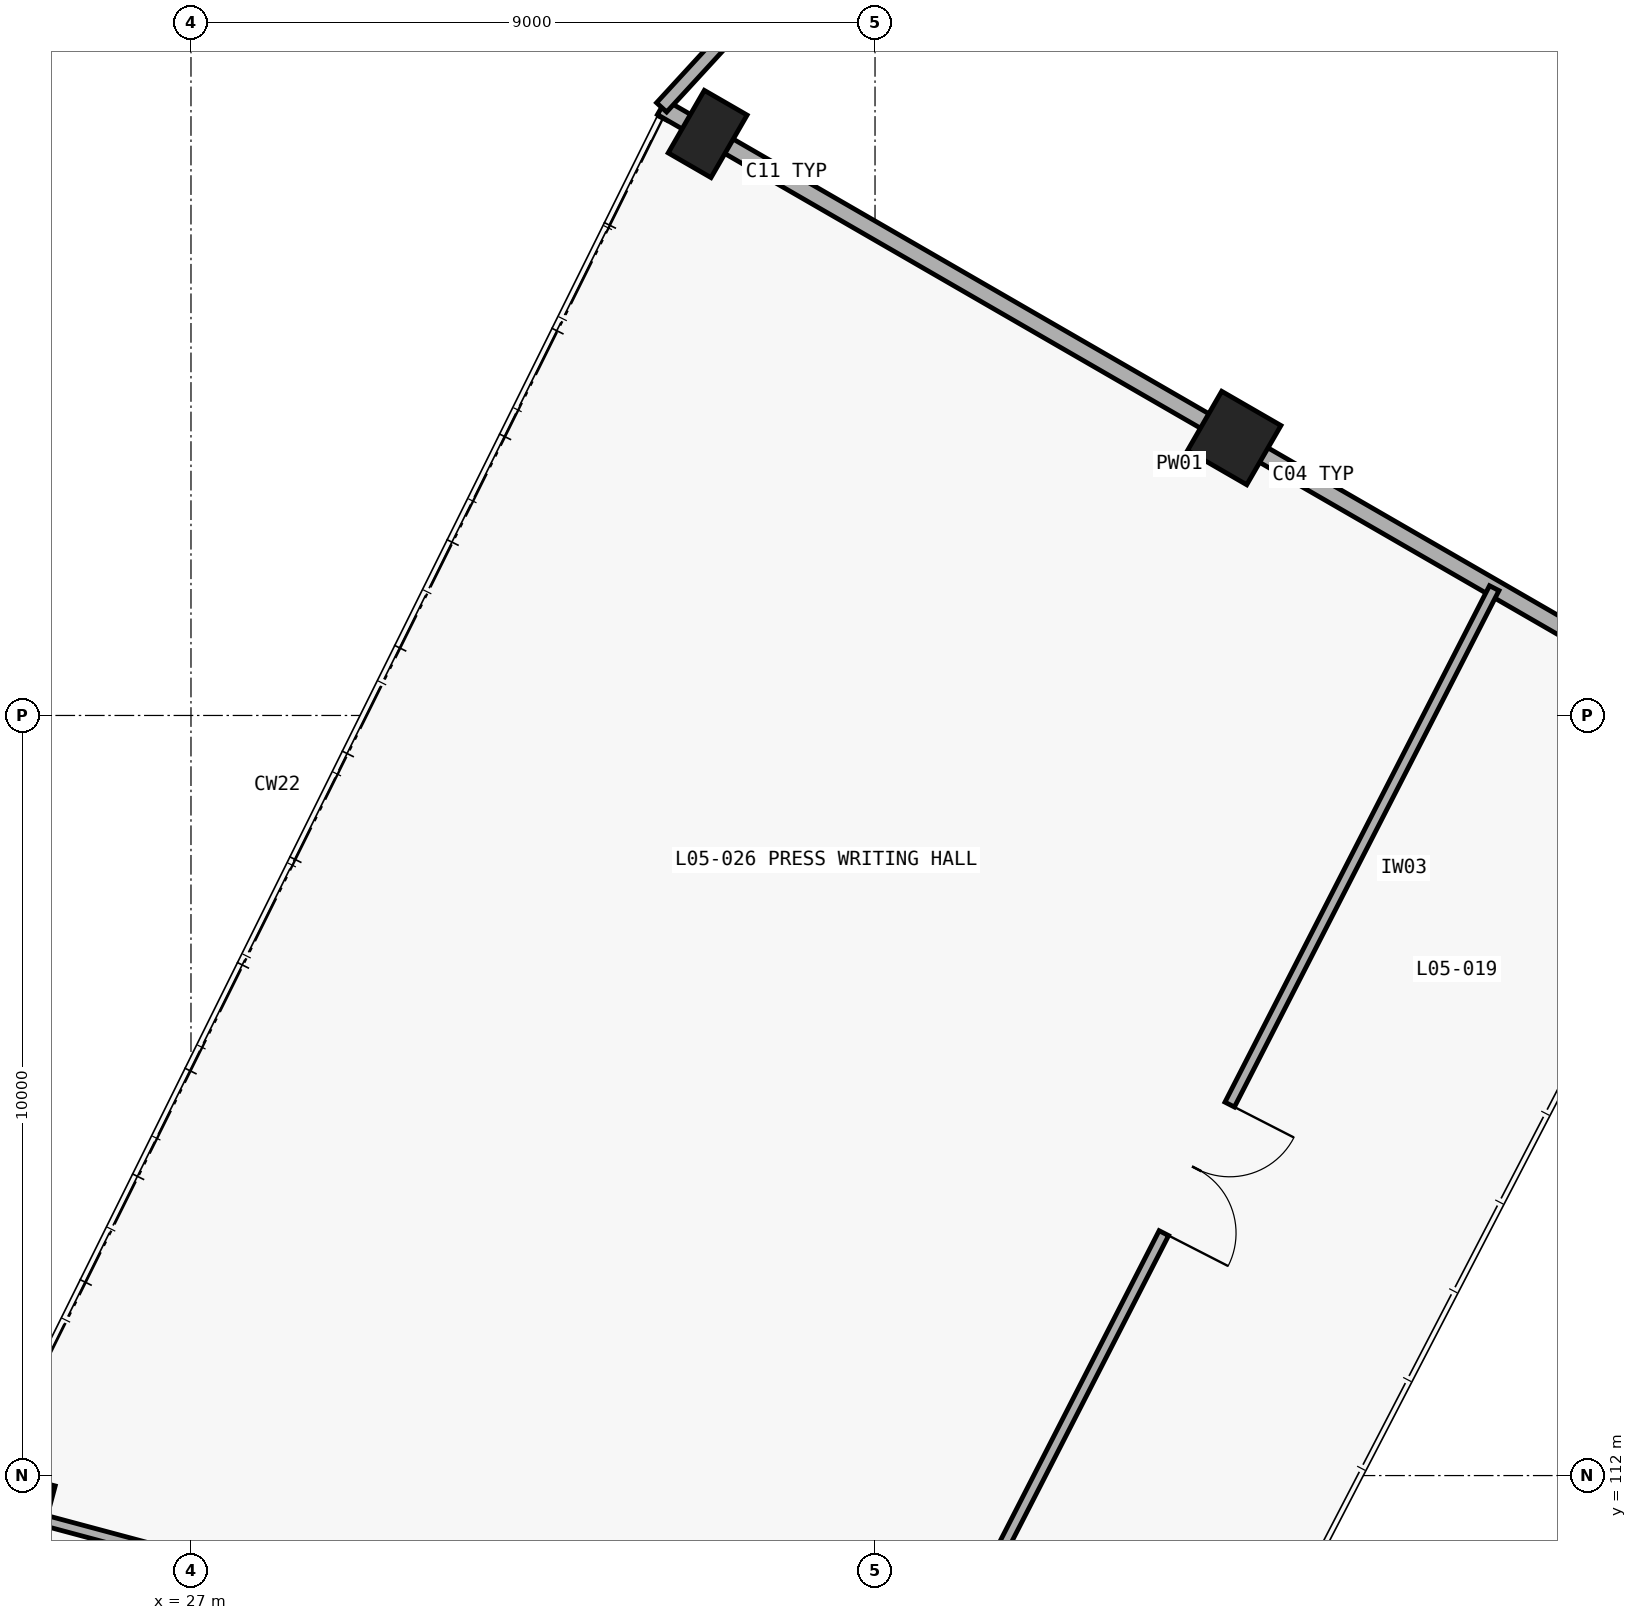
"""IFC4 building model, lengths in metres.
Left out: names, types, materials, properties, quantities, classifications, styles, units other than length and angle.
Written with IfcOpenShell. Run it as: python <this file> out.ifc"""

import sys

from ifc_helpers import new_model, si_unit, direction, frame, frame_2d, origin, origin_2d, place, context, subcontext, project, spatial, rectangle, extrude, element, fill, save


model = new_model("IFC4")
c1 = context("Model", 3, precision=1e-05, world=origin(), true_north=direction((0.0, 1.0)))
c2 = subcontext(c1, "Body", "Model", "MODEL_VIEW")
j1 = project(units=[si_unit("LENGTHUNIT", "METRE"), si_unit("PLANEANGLEUNIT", "RADIAN")], contexts=[c1])
p1 = place(None, origin())
s1 = spatial("IfcSite", under=j1, at=p1, CompositionType="ELEMENT")
p2 = place(p1, origin())
s2 = spatial("IfcBuilding", under=s1, at=p2, CompositionType="ELEMENT")
p3 = place(p2, frame((0.0, 0.0, 24.6)))
s3 = spatial("IfcBuildingStorey", under=s2, at=p3, CompositionType="ELEMENT", Elevation=24.6)
p4 = place(p3, frame((33.798, 129.65, 0.0), z_axis=(0.0, 0.0, 1.0), x_axis=(-0.866025403784, 0.5, 0.0)))
e1 = element("IfcColumn", 1, at=p4, inside=s3, PredefinedType="COLUMN", context=c2, shape_type="SweptSolid", body=[
    extrude(rectangle(XDim=0.65, YDim=0.95, at=origin_2d()), origin(), (0.0, 0.0, 1.0), 4.8),
])
p5 = place(p3, frame((40.726, 125.65, 0.0), z_axis=(0.0, 0.0, 1.0), x_axis=(-0.866025403784, 0.5, 0.0)))
e2 = element("IfcColumn", 2, at=p5, inside=s3, PredefinedType="COLUMN", context=c2, shape_type="SweptSolid", body=[
    extrude(rectangle(XDim=0.9, YDim=0.9, at=origin_2d()), origin(), (0.0, 0.0, 1.0), 4.8),
])
p6 = place(p3, frame((24.777, 111.489, 0.0), z_axis=(0.0, 0.0, 1.0), x_axis=(-0.965925826289, 0.258819045103, 0.0)))
e3 = element("IfcColumn", 3, at=p6, inside=s3, PredefinedType="COLUMN", context=c2, shape_type="SweptSolid", body=[
    extrude(rectangle(XDim=0.65, YDim=0.95, at=origin_2d()), origin(), (0.0, 0.0, 1.0), 4.8),
])
p7 = place(p3, frame((47.481, 121.75, 0.0), z_axis=(0.0, 0.0, 1.0), x_axis=(-0.866019999656, 0.500009360108, 0.0)))
e4 = element("IfcWall", 4, at=p7, inside=s3, PredefinedType="PARAPET", context=c2, shape_type="SweptSolid", body=[
    extrude(rectangle(XDim=16.5, YDim=0.22, at=frame_2d((8.25, 0.0))), origin(), (0.0, 0.0, 1.0), 3.89),
])
p8 = place(p3, frame((47.653, 145.74, 0.0), z_axis=(0.0, 0.0, 1.0), x_axis=(-0.676559509476, -0.736387961701, 0.0)))
e5 = element("IfcWall", 5, at=p8, inside=s3, PredefinedType="PARAPET", context=c2, shape_type="SweptSolid", body=[
    extrude(rectangle(XDim=21.375, YDim=0.18, at=frame_2d((10.687, 0.0))), origin(), (0.0, 0.0, 1.0), 1.15),
])
p9 = place(p3, frame((44.147, 123.675, 0.0), z_axis=(0.0, 0.0, 1.0), x_axis=(-0.455924229974, -0.890018593358, 0.0)))
e6 = element("IfcWall", 6, at=p9, inside=s3, PredefinedType="PARTITIONING", context=c2, shape_type="SweptSolid", body=[
    extrude(rectangle(XDim=17.167, YDim=0.14, at=frame_2d((8.583, 0.0))), origin(), (0.0, 0.0, 1.0), 3.84),
])
p10 = place(p9, frame((7.634, 0.0, 0.0)))
e7 = element("IfcOpeningElement", 7, at=p10, cuts=e6, PredefinedType="OPENING", context=c2, shape_type="SweptSolid", body=[
    extrude(rectangle(XDim=1.9, YDim=2.25, at=frame_2d((0.95, 1.125))), frame((0.0, 0.08, 0.0), z_axis=(0.0, -1.0, 0.0), x_axis=(1.0, 0.0, 0.0)), (0.0, 0.0, 1.0), 0.16),
])
p11 = place(p3, frame((32.938, 109.302, 0.0), z_axis=(0.0, 0.0, 1.0), x_axis=(-0.965916586161, 0.258853527267, 0.0)))
e8 = element("IfcWall", 8, at=p11, inside=s3, PredefinedType="PARTITIONING", context=c2, shape_type="SweptSolid", body=[
    extrude(rectangle(XDim=8.139, YDim=0.14, at=frame_2d((4.07, 0.0))), origin(), (0.0, 0.0, 1.0), 3.84),
])
p12 = place(p10, origin())
e9 = element("IfcDoor", 9, at=p12, inside=s3, OperationType="DOUBLE_DOOR_SINGLE_SWING", PredefinedType="DOOR", context=c2, shape_type="SweptSolid", body=[
    extrude(rectangle(XDim=1.9, YDim=2.25, at=frame_2d((0.95, 1.125))), frame((0.0, 0.025, 0.0), z_axis=(0.0, -1.0, 0.0), x_axis=(1.0, 0.0, 0.0)), (0.0, 0.0, 1.0), 0.05),
])
fill(e7, e9)
save(model, sys.argv[1])
